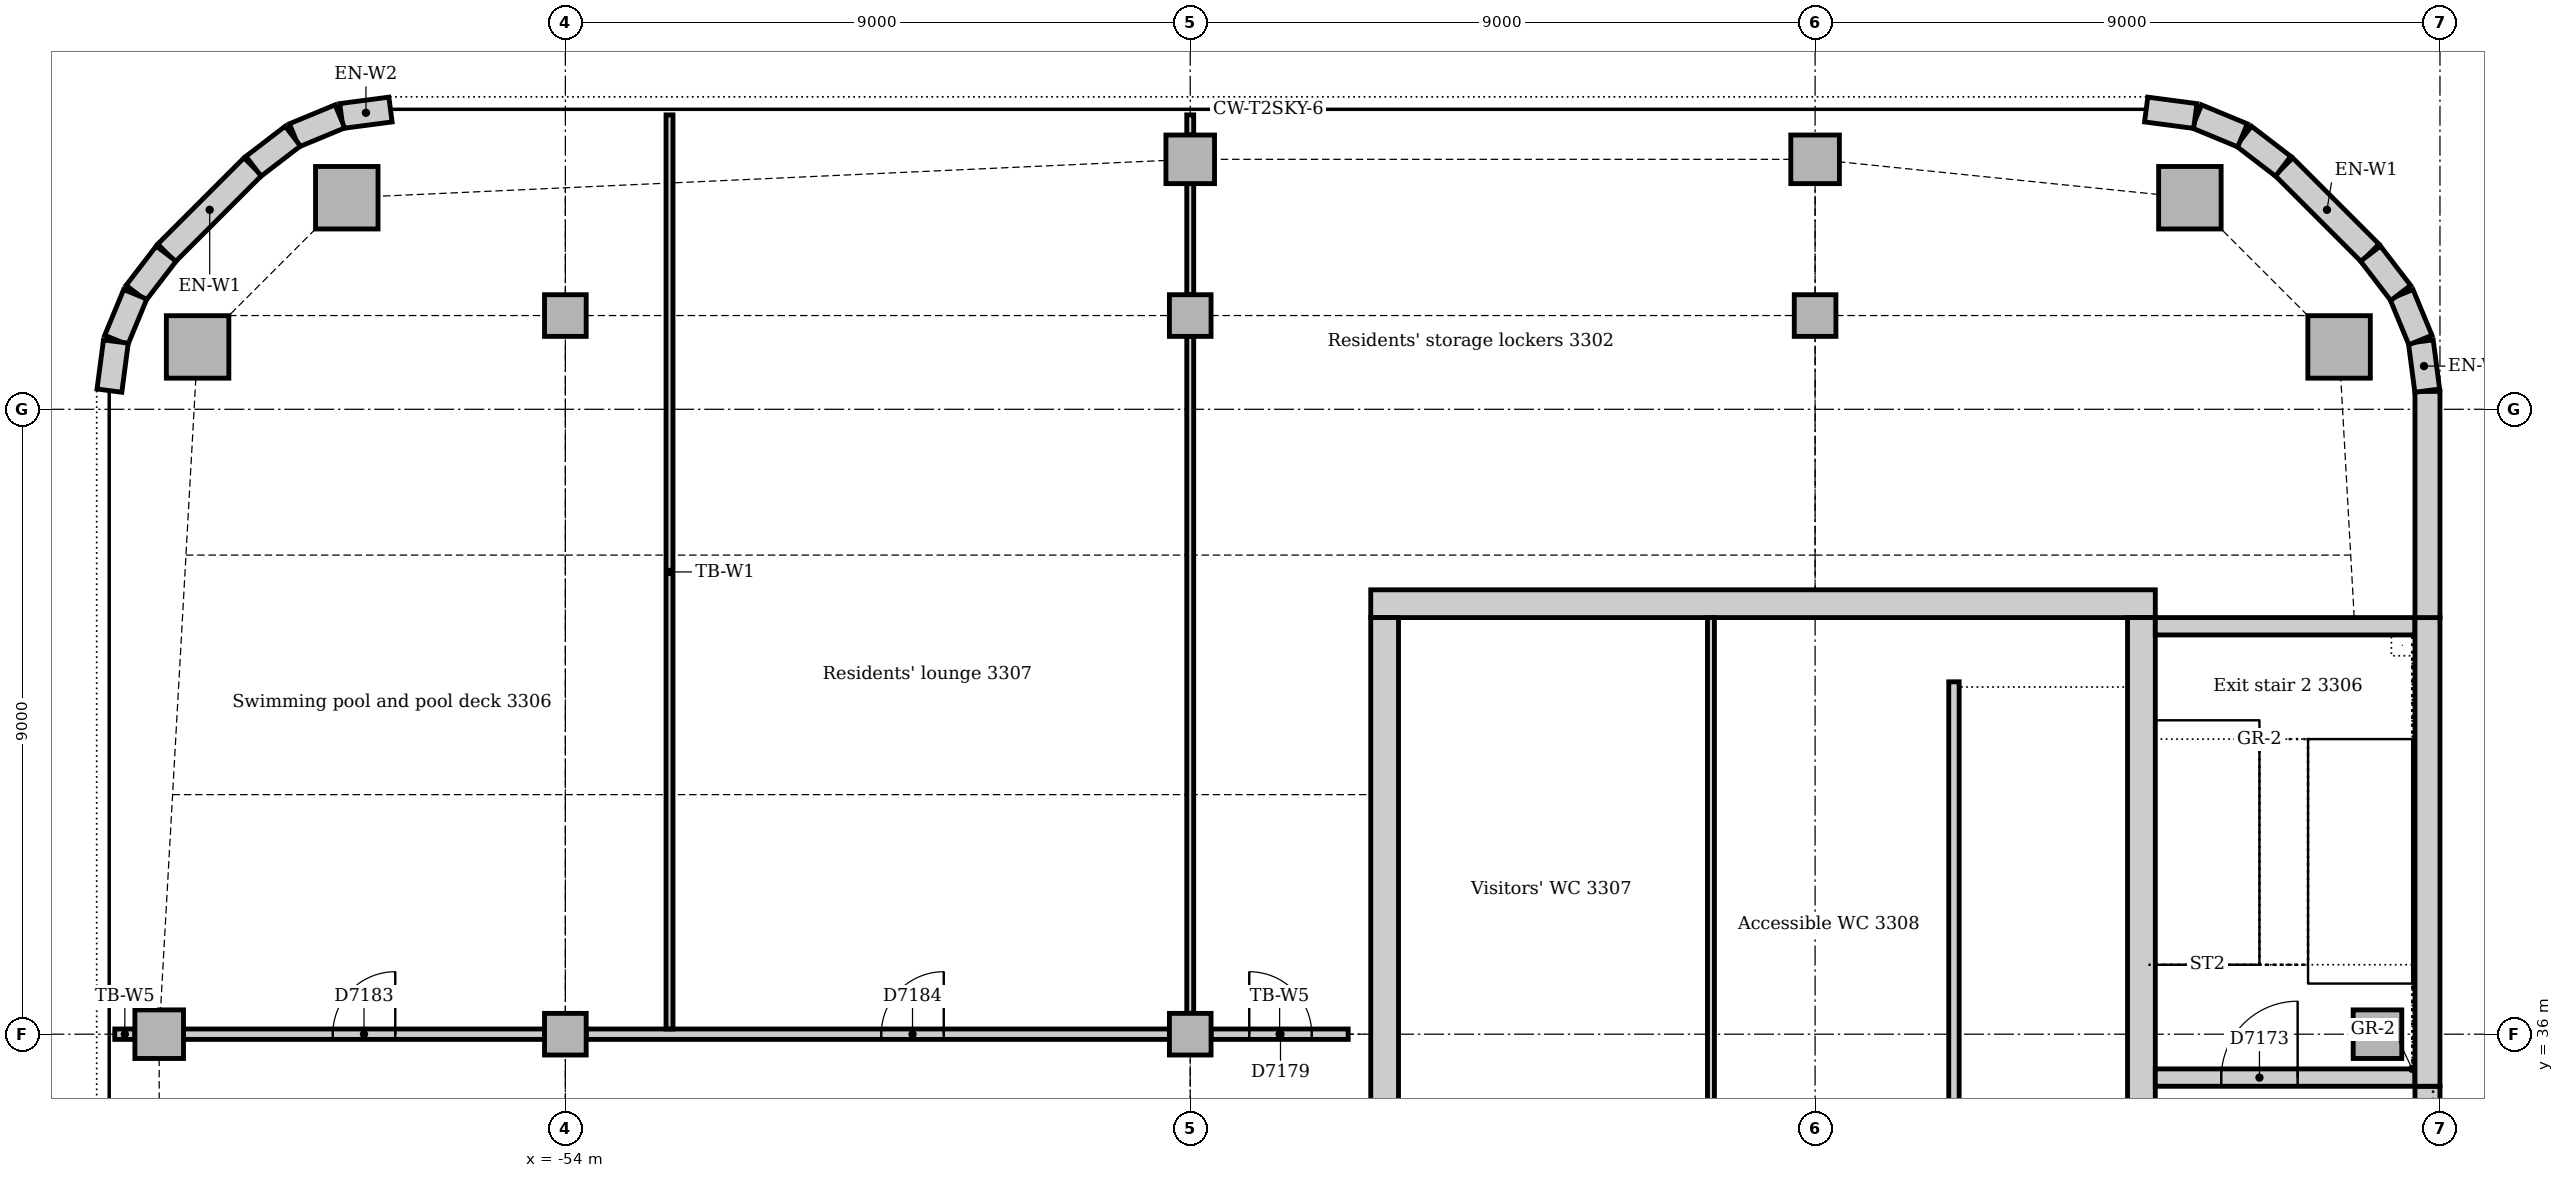
"""IFC4 building model, lengths in metres.
Left out: names, types, materials, properties, quantities, classifications, styles, units other than length and angle.
Written with IfcOpenShell. Run it as: python <this file> out.ifc"""

import sys

from ifc_helpers import new_model, si_unit, direction, frame, frame_2d, origin, origin_2d, place, context, subcontext, project, spatial, rectangle, extrude, element, fill, save


model = new_model("IFC4")
c1 = context("Model", 3, precision=1e-05, world=origin(), true_north=direction((0.0, 1.0)))
c2 = subcontext(c1, "Body", "Model", "MODEL_VIEW")
j1 = project(units=[si_unit("LENGTHUNIT", "METRE"), si_unit("PLANEANGLEUNIT", "RADIAN")], contexts=[c1])
p1 = place(None, origin())
s1 = spatial("IfcSite", under=j1, at=p1, CompositionType="ELEMENT")
p2 = place(p1, origin())
s2 = spatial("IfcBuilding", under=s1, at=p2, CompositionType="ELEMENT")
p3 = place(p2, frame((0.0, 0.0, 140.0)))
s3 = spatial("IfcBuildingStorey", under=s2, at=p3, CompositionType="ELEMENT", Elevation=140.0)
p4 = place(p3, frame((-31.1, 42.2, 0.0), z_axis=(0.0, 0.0, 1.0), x_axis=(-1.0, 0.0, 0.0)))
e1 = element("IfcWall", 1, at=p4, inside=s3, PredefinedType="SOLIDWALL", context=c2, shape_type="SweptSolid", body=[
    extrude(rectangle(XDim=11.3, YDim=0.4, at=frame_2d((5.65, 0.0))), origin(), (0.0, 0.0, 1.0), 3.7),
])
p5 = place(p3, frame((-31.3, 30.5, 0.0), z_axis=(0.0, 0.0, 1.0), x_axis=(0.0, 1.0, 0.0)))
e2 = element("IfcWall", 2, at=p5, inside=s3, PredefinedType="SOLIDWALL", context=c2, shape_type="SweptSolid", body=[
    extrude(rectangle(XDim=11.5, YDim=0.4, at=frame_2d((5.75, 0.0))), origin(), (0.0, 0.0, 1.0), 3.7),
])
p6 = place(p5, frame((0.85, 0.0, 0.0)))
e3 = element("IfcOpeningElement", 3, at=p6, cuts=e2, PredefinedType="OPENING", context=c2, shape_type="SweptSolid", body=[
    extrude(rectangle(XDim=1.8, YDim=2.1, at=frame_2d((0.9, 1.05))), frame((0.0, 0.21, 0.0), z_axis=(0.0, -1.0, 0.0), x_axis=(1.0, 0.0, 0.0)), (0.0, 0.0, 1.0), 0.42),
])
p7 = place(p3, frame((-42.2, 42.0, 0.0), z_axis=(0.0, 0.0, 1.0), x_axis=(0.0, -1.0, 0.0)))
e4 = element("IfcWall", 4, at=p7, inside=s3, PredefinedType="SOLIDWALL", context=c2, shape_type="SweptSolid", body=[
    extrude(rectangle(XDim=11.5, YDim=0.4, at=frame_2d((5.75, 0.0))), origin(), (0.0, 0.0, 1.0), 3.7),
])
p8 = place(p7, frame((8.85, 0.0, 0.0)))
e5 = element("IfcOpeningElement", 5, at=p8, cuts=e4, PredefinedType="OPENING", context=c2, shape_type="SweptSolid", body=[
    extrude(rectangle(XDim=1.8, YDim=2.1, at=frame_2d((0.9, 1.05))), frame((0.0, 0.21, 0.0), z_axis=(0.0, -1.0, 0.0), x_axis=(1.0, 0.0, 0.0)), (0.0, 0.0, 1.0), 0.42),
])
p9 = place(p3, frame((-31.1, 35.375, 0.0), z_axis=(0.0, 0.0, 1.0), x_axis=(1.0, 0.0, 0.0)))
e6 = element("IfcWall", 6, at=p9, inside=s3, PredefinedType="SOLIDWALL", context=c2, shape_type="SweptSolid", body=[
    extrude(rectangle(XDim=3.74, YDim=0.25, at=frame_2d((1.87, 0.0))), origin(), (0.0, 0.0, 1.0), 3.7),
])
p10 = place(p9, frame((0.95, 0.0, 0.0)))
e7 = element("IfcOpeningElement", 7, at=p10, cuts=e6, PredefinedType="OPENING", context=c2, shape_type="SweptSolid", body=[
    extrude(rectangle(XDim=1.1, YDim=2.1, at=frame_2d((0.55, 1.05))), frame((0.0, 0.135, 0.0), z_axis=(0.0, -1.0, 0.0), x_axis=(1.0, 0.0, 0.0)), (0.0, 0.0, 1.0), 0.27),
])
p11 = place(p3, frame((-27.36, 41.875, 0.0), z_axis=(0.0, 0.0, 1.0), x_axis=(-1.0, 0.0, 0.0)))
e8 = element("IfcWall", 8, at=p11, inside=s3, PredefinedType="SOLIDWALL", context=c2, shape_type="SweptSolid", body=[
    extrude(rectangle(XDim=3.74, YDim=0.25, at=frame_2d((1.87, 0.0))), origin(), (0.0, 0.0, 1.0), 3.7),
])
for number, where, z_axis, x_axis in (
    (9, (-28.453, 45.898, 0.0), (0.0, 0.0, 1.0), (1.0, 0.0, 0.0)),
    (10, (-30.602, 48.047, 0.0), (0.0, 0.0, 1.0), (1.0, 0.0, 0.0)),
    (11, (-57.148, 48.047, 0.0), (0.0, 0.0, 1.0), (1.0, 0.0, 0.0)),
    (12, (-59.297, 45.898, 0.0), (0.0, 0.0, 1.0), (1.0, 0.0, 0.0)),
):
    element("IfcColumn", number, at=place(p3, frame(where, z_axis=z_axis, x_axis=x_axis)), inside=s3, PredefinedType="COLUMN", context=c2, shape_type="SweptSolid", body=[
        extrude(rectangle(XDim=0.9, YDim=0.9, at=origin_2d()), origin(), (0.0, 0.0, 1.0), 3.7),
    ])
p12 = place(p3, frame((-27.9, 36.0, 0.0), z_axis=(0.0, 0.0, 1.0), x_axis=(1.0, 0.0, 0.0)))
e13 = element("IfcColumn", 13, at=p12, inside=s3, PredefinedType="COLUMN", context=c2, shape_type="SweptSolid", body=[
    extrude(rectangle(XDim=0.7, YDim=0.7, at=origin_2d()), origin(), (0.0, 0.0, 1.0), 4.0),
])
for number, where, z_axis, x_axis in (
    (14, (-45.0, 48.6, 0.0), (0.0, 0.0, 1.0), (1.0, 0.0, 0.0)),
    (15, (-36.0, 48.6, 0.0), (0.0, 0.0, 1.0), (1.0, 0.0, 0.0)),
    (16, (-59.85, 36.0, 0.0), (0.0, 0.0, 1.0), (1.0, 0.0, 0.0)),
):
    element("IfcColumn", number, at=place(p3, frame(where, z_axis=z_axis, x_axis=x_axis)), inside=s3, PredefinedType="COLUMN", context=c2, shape_type="SweptSolid", body=[
        extrude(rectangle(XDim=0.7, YDim=0.7, at=origin_2d()), origin(), (0.0, 0.0, 1.0), 3.7),
    ])
for number, where, z_axis, x_axis in (
    (17, (-54.0, 36.0, 0.0), (0.0, 0.0, 1.0), (1.0, 0.0, 0.0)),
    (18, (-54.0, 46.35, 0.0), (0.0, 0.0, 1.0), (1.0, 0.0, 0.0)),
    (19, (-45.0, 36.0, 0.0), (0.0, 0.0, 1.0), (1.0, 0.0, 0.0)),
    (20, (-45.0, 46.35, 0.0), (0.0, 0.0, 1.0), (1.0, 0.0, 0.0)),
    (21, (-36.0, 46.35, 0.0), (0.0, 0.0, 1.0), (1.0, 0.0, 0.0)),
):
    element("IfcColumn", number, at=place(p3, frame(where, z_axis=z_axis, x_axis=x_axis)), inside=s3, PredefinedType="COLUMN", context=c2, shape_type="SweptSolid", body=[
        extrude(rectangle(XDim=0.6, YDim=0.6, at=origin_2d()), origin(), (0.0, 0.0, 1.0), 3.7),
    ])
p13 = place(p3, frame((-27.18, 34.5, 0.0), z_axis=(0.0, 0.0, 1.0), x_axis=(0.0, 1.0, 0.0)))
e22 = element("IfcWall", 22, at=p13, inside=s3, PredefinedType="STANDARD", context=c2, shape_type="SweptSolid", body=[
    extrude(rectangle(XDim=0.75, YDim=0.36, at=frame_2d((0.375, 0.0))), origin(), (0.0, 0.0, 1.0), 3.7),
])
p14 = place(p3, frame((-27.18, 35.25, 0.0), z_axis=(0.0, 0.0, 1.0), x_axis=(0.0, 1.0, 0.0)))
e23 = element("IfcWall", 23, at=p14, inside=s3, PredefinedType="STANDARD", context=c2, shape_type="SweptSolid", body=[
    extrude(rectangle(XDim=6.75, YDim=0.36, at=frame_2d((3.375, 0.0))), origin(), (0.0, 0.0, 1.0), 3.7),
])
p15 = place(p3, frame((-27.18, 42.0, 0.0), z_axis=(0.0, 0.0, 1.0), x_axis=(0.0, 1.0, 0.0)))
e24 = element("IfcWall", 24, at=p15, inside=s3, PredefinedType="STANDARD", context=c2, shape_type="SweptSolid", body=[
    extrude(rectangle(XDim=3.257, YDim=0.36, at=frame_2d((1.629, 0.0))), origin(), (0.0, 0.0, 1.0), 3.7),
])
for number, where, z_axis, x_axis in (
    (25, (-28.006, 47.251, 0.0), (0.0, 0.0, 1.0), (-0.707, 0.707, 0.0)),
    (26, (-58.501, 48.494, 0.0), (0.0, 0.0, 1.0), (-0.707, -0.707, 0.0)),
):
    element("IfcWall", number, at=place(p3, frame(where, z_axis=z_axis, x_axis=x_axis)), inside=s3, PredefinedType="STANDARD", context=c2, shape_type="SweptSolid", body=[
        extrude(rectangle(XDim=1.757, YDim=0.36, at=frame_2d((0.879, 0.0))), origin(), (0.0, 0.0, 1.0), 3.7),
    ])
for number, where, z_axis, x_axis in (
    (27, (-27.183, 45.269, 0.0), (0.0, 0.0, 1.0), (-0.131, 0.991, 0.0)),
    (28, (-27.282, 45.997, 0.0), (0.0, 0.0, 1.0), (-0.383, 0.924, 0.0)),
):
    element("IfcWall", number, at=place(p3, frame(where, z_axis=z_axis, x_axis=x_axis)), inside=s3, PredefinedType="STANDARD", context=c2, shape_type="SweptSolid", body=[
        extrude(rectangle(XDim=0.713, YDim=0.36, at=frame_2d((0.356, 0.0))), origin(), (0.0, 0.0, 1.0), 3.7),
    ])
for number, where, z_axis, x_axis in (
    (29, (-27.566, 46.675, 0.0), (0.0, 0.0, 1.0), (-0.609, 0.793, 0.0)),
    (30, (-29.259, 48.5, 0.0), (0.0, 0.0, 1.0), (-0.793, 0.609, 0.0)),
):
    element("IfcWall", number, at=place(p3, frame(where, z_axis=z_axis, x_axis=x_axis)), inside=s3, PredefinedType="STANDARD", context=c2, shape_type="SweptSolid", body=[
        extrude(rectangle(XDim=0.713, YDim=0.36, at=frame_2d((0.357, 0.0))), origin(), (0.0, 0.0, 1.0), 3.7),
    ])
for number, where, z_axis, x_axis in (
    (31, (-29.844, 48.945, 0.0), (0.0, 0.0, 1.0), (-0.924, 0.383, 0.0)),
    (32, (-30.524, 49.224, 0.0), (0.0, 0.0, 1.0), (-0.991, 0.131, 0.0)),
    (33, (-56.519, 49.317, 0.0), (0.0, 0.0, 1.0), (-0.991, -0.131, 0.0)),
    (34, (-57.247, 49.218, 0.0), (0.0, 0.0, 1.0), (-0.924, -0.383, 0.0)),
):
    element("IfcWall", number, at=place(p3, frame(where, z_axis=z_axis, x_axis=x_axis)), inside=s3, PredefinedType="STANDARD", context=c2, shape_type="SweptSolid", body=[
        extrude(rectangle(XDim=0.713, YDim=0.36, at=frame_2d((0.356, 0.0))), origin(), (0.0, 0.0, 1.0), 3.7),
    ])
for number, where, z_axis, x_axis in (
    (35, (-57.925, 48.934, 0.0), (0.0, 0.0, 1.0), (-0.793, -0.609, 0.0)),
    (36, (-59.75, 47.241, 0.0), (0.0, 0.0, 1.0), (-0.609, -0.793, 0.0)),
):
    element("IfcWall", number, at=place(p3, frame(where, z_axis=z_axis, x_axis=x_axis)), inside=s3, PredefinedType="STANDARD", context=c2, shape_type="SweptSolid", body=[
        extrude(rectangle(XDim=0.713, YDim=0.36, at=frame_2d((0.357, 0.0))), origin(), (0.0, 0.0, 1.0), 3.7),
    ])
for number, where, z_axis, x_axis in (
    (37, (-60.195, 46.656, 0.0), (0.0, 0.0, 1.0), (-0.383, -0.924, 0.0)),
    (38, (-60.474, 45.976, 0.0), (0.0, 0.0, 1.0), (-0.131, -0.991, 0.0)),
):
    element("IfcWall", number, at=place(p3, frame(where, z_axis=z_axis, x_axis=x_axis)), inside=s3, PredefinedType="STANDARD", context=c2, shape_type="SweptSolid", body=[
        extrude(rectangle(XDim=0.713, YDim=0.36, at=frame_2d((0.356, 0.0))), origin(), (0.0, 0.0, 1.0), 3.7),
    ])
p16 = place(p3, frame((-34.0, 41.075, 0.0), z_axis=(0.0, 0.0, 1.0), x_axis=(0.0, -1.0, 0.0)))
e39 = element("IfcWall", 39, at=p16, inside=s3, PredefinedType="SOLIDWALL", context=c2, shape_type="SweptSolid", body=[
    extrude(rectangle(XDim=7.0, YDim=0.15, at=frame_2d((3.5, 0.0))), origin(), (0.0, 0.0, 1.0), 3.55),
])
p17 = place(p3, frame((-37.5, 34.075, 0.0), z_axis=(0.0, 0.0, 1.0), x_axis=(0.0, 1.0, 0.0)))
e40 = element("IfcWall", 40, at=p17, inside=s3, PredefinedType="PARTITIONING", context=c2, shape_type="SweptSolid", body=[
    extrude(rectangle(XDim=7.925, YDim=0.1, at=frame_2d((3.962, 0.0))), origin(), (0.0, 0.0, 1.0), 3.55),
])
p18 = place(p3, frame((-44.7, 36.0, 0.0), z_axis=(0.0, 0.0, 1.0), x_axis=(1.0, 0.0, 0.0)))
e41 = element("IfcWall", 41, at=p18, inside=s3, PredefinedType="PARTITIONING", context=c2, shape_type="SweptSolid", body=[
    extrude(rectangle(XDim=1.975, YDim=0.15, at=frame_2d((0.988, 0.0))), origin(), (0.0, 0.0, 1.0), 3.302),
])
p19 = place(p18, frame((0.55, 0.0, 0.0)))
e42 = element("IfcOpeningElement", 42, at=p19, cuts=e41, PredefinedType="OPENING", context=c2, shape_type="SweptSolid", body=[
    extrude(rectangle(XDim=0.9, YDim=2.1, at=frame_2d((0.45, 1.05))), frame((0.0, 0.085, 0.0), z_axis=(0.0, -1.0, 0.0), x_axis=(1.0, 0.0, 0.0)), (0.0, 0.0, 1.0), 0.17),
])
p20 = place(p3, frame((-53.7, 36.0, 0.0), z_axis=(0.0, 0.0, 1.0), x_axis=(1.0, 0.0, 0.0)))
e43 = element("IfcWall", 43, at=p20, inside=s3, PredefinedType="PARTITIONING", context=c2, shape_type="SweptSolid", body=[
    extrude(rectangle(XDim=8.4, YDim=0.15, at=frame_2d((4.2, 0.0))), origin(), (0.0, 0.0, 1.0), 2.962),
])
p21 = place(p20, frame((4.25, 0.0, 0.0)))
e44 = element("IfcOpeningElement", 44, at=p21, cuts=e43, PredefinedType="OPENING", context=c2, shape_type="SweptSolid", body=[
    extrude(rectangle(XDim=0.9, YDim=2.1, at=frame_2d((0.45, 1.05))), frame((0.0, 0.085, 0.0), z_axis=(0.0, -1.0, 0.0), x_axis=(1.0, 0.0, 0.0)), (0.0, 0.0, 1.0), 0.17),
])
p22 = place(p3, frame((-59.5, 36.0, 0.0), z_axis=(0.0, 0.0, 1.0), x_axis=(1.0, 0.0, 0.0)))
e45 = element("IfcWall", 45, at=p22, inside=s3, PredefinedType="PARTITIONING", context=c2, shape_type="SweptSolid", body=[
    extrude(rectangle(XDim=5.2, YDim=0.15, at=frame_2d((2.6, 0.0))), origin(), (0.0, 0.0, 1.0), 3.05),
])
p23 = place(p22, frame((2.15, 0.0, 0.0)))
e46 = element("IfcOpeningElement", 46, at=p23, cuts=e45, PredefinedType="OPENING", context=c2, shape_type="SweptSolid", body=[
    extrude(rectangle(XDim=0.9, YDim=2.1, at=frame_2d((0.45, 1.05))), frame((0.0, 0.085, 0.0), z_axis=(0.0, -1.0, 0.0), x_axis=(1.0, 0.0, 0.0)), (0.0, 0.0, 1.0), 0.17),
])
p24 = place(p3, frame((-60.49, 36.0, 0.0), z_axis=(0.0, 0.0, 1.0), x_axis=(1.0, 0.0, 0.0)))
e47 = element("IfcWall", 47, at=p24, inside=s3, PredefinedType="PARTITIONING", context=c2, shape_type="SweptSolid", body=[
    extrude(rectangle(XDim=0.29, YDim=0.15, at=frame_2d((0.145, 0.0))), origin(), (0.0, 0.0, 1.0), 3.55),
])
p25 = place(p3, frame((-52.5, 36.075, 0.0), z_axis=(0.0, 0.0, 1.0), x_axis=(0.0, 1.0, 0.0)))
e48 = element("IfcWall", 48, at=p25, inside=s3, PredefinedType="PARTITIONING", context=c2, shape_type="SweptSolid", body=[
    extrude(rectangle(XDim=13.165, YDim=0.1, at=frame_2d((6.582, 0.0))), origin(), (0.0, 0.0, 1.0), 3.55),
])
p26 = place(p3, frame((-45.0, 36.3, 0.0), z_axis=(0.0, 0.0, 1.0), x_axis=(0.0, 1.0, 0.0)))
e49 = element("IfcWall", 49, at=p26, inside=s3, PredefinedType="PARTITIONING", context=c2, shape_type="SweptSolid", body=[
    extrude(rectangle(XDim=9.75, YDim=0.1, at=frame_2d((4.875, 0.0))), origin(), (0.0, 0.0, 1.0), 3.062),
])
p27 = place(p3, frame((-45.0, 46.65, 0.0), z_axis=(0.0, 0.0, 1.0), x_axis=(0.0, 1.0, 0.0)))
e50 = element("IfcWall", 50, at=p27, inside=s3, PredefinedType="PARTITIONING", context=c2, shape_type="SweptSolid", body=[
    extrude(rectangle(XDim=1.6, YDim=0.1, at=frame_2d((0.8, 0.0))), origin(), (0.0, 0.0, 1.0), 3.352),
])
p28 = place(p3, frame((-45.0, 48.95, 0.0), z_axis=(0.0, 0.0, 1.0), x_axis=(0.0, 1.0, 0.0)))
e51 = element("IfcWall", 51, at=p28, inside=s3, PredefinedType="PARTITIONING", context=c2, shape_type="SweptSolid", body=[
    extrude(rectangle(XDim=0.29, YDim=0.1, at=frame_2d((0.145, 0.0))), origin(), (0.0, 0.0, 1.0), 3.55),
])
p29 = place(p10, origin())
e52 = element("IfcDoor", 52, at=p29, inside=s3, OperationType="SINGLE_SWING_RIGHT", PredefinedType="DOOR", context=c2, shape_type="SweptSolid", body=[
    extrude(rectangle(XDim=1.1, YDim=2.1, at=frame_2d((0.55, 1.05))), frame((0.0, 0.025, 0.0), z_axis=(0.0, -1.0, 0.0), x_axis=(1.0, 0.0, 0.0)), (0.0, 0.0, 1.0), 0.05),
])
fill(e7, e52)
p30 = place(p19, origin())
e53 = element("IfcDoor", 53, at=p30, inside=s3, OperationType="SINGLE_SWING_LEFT", PredefinedType="DOOR", context=c2, shape_type="SweptSolid", body=[
    extrude(rectangle(XDim=0.9, YDim=2.1, at=frame_2d((0.45, 1.05))), frame((0.0, 0.025, 0.0), z_axis=(0.0, -1.0, 0.0), x_axis=(1.0, 0.0, 0.0)), (0.0, 0.0, 1.0), 0.05),
])
fill(e42, e53)
p31 = place(p23, origin())
e54 = element("IfcDoor", 54, at=p31, inside=s3, OperationType="SINGLE_SWING_RIGHT", PredefinedType="DOOR", context=c2, shape_type="SweptSolid", body=[
    extrude(rectangle(XDim=0.9, YDim=2.1, at=frame_2d((0.45, 1.05))), frame((0.0, 0.025, 0.0), z_axis=(0.0, -1.0, 0.0), x_axis=(1.0, 0.0, 0.0)), (0.0, 0.0, 1.0), 0.05),
])
fill(e46, e54)
p32 = place(p21, origin())
e55 = element("IfcDoor", 55, at=p32, inside=s3, OperationType="SINGLE_SWING_RIGHT", PredefinedType="DOOR", context=c2, shape_type="SweptSolid", body=[
    extrude(rectangle(XDim=0.9, YDim=2.1, at=frame_2d((0.45, 1.05))), frame((0.0, 0.025, 0.0), z_axis=(0.0, -1.0, 0.0), x_axis=(1.0, 0.0, 0.0)), (0.0, 0.0, 1.0), 0.05),
])
fill(e44, e55)
save(model, sys.argv[1])
